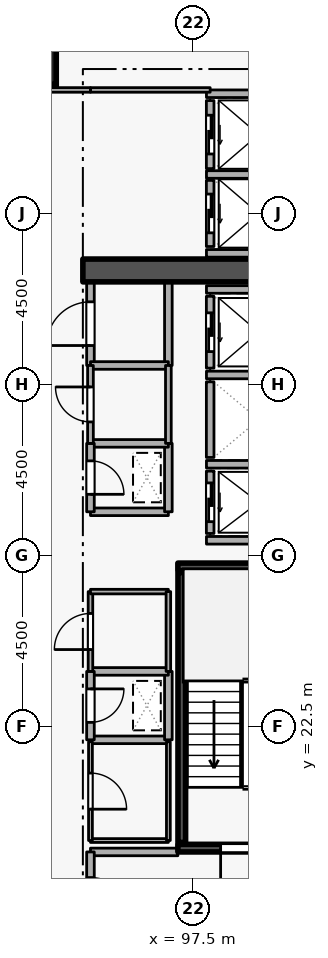
"""IFC4 building model, lengths in metres.
Left out: names, types, materials, properties, quantities, classifications, styles, units other than length and angle.
Written with IfcOpenShell. Run it as: python <this file> out.ifc"""

import sys

from ifc_helpers import new_model, si_unit, direction, frame, frame_2d, origin, origin_2d, place, context, subcontext, project, spatial, rectangle, extrude, element, fill, save


model = new_model("IFC4")
c1 = context("Model", 3, precision=1e-05, world=origin(), true_north=direction((0.0, 1.0)))
c2 = subcontext(c1, "Body", "Model", "MODEL_VIEW")
j1 = project(units=[si_unit("LENGTHUNIT", "METRE"), si_unit("PLANEANGLEUNIT", "RADIAN")], contexts=[c1])
p1 = place(None, origin())
s1 = spatial("IfcSite", under=j1, at=p1, CompositionType="ELEMENT")
p2 = place(p1, origin())
s2 = spatial("IfcBuilding", under=s1, at=p2, CompositionType="ELEMENT")
p3 = place(p2, frame((0.0, 0.0, 87.3)))
s3 = spatial("IfcBuildingStorey", under=s2, at=p3, CompositionType="ELEMENT", Elevation=87.3)
p4 = place(p3, frame((94.6, 34.5, 0.0), z_axis=(0.0, 0.0, 1.0), x_axis=(1.0, 0.0, 0.0)))
e1 = element("IfcWall", 1, at=p4, inside=s3, PredefinedType="SHEAR", context=c2, shape_type="SweptSolid", body=[
    extrude(rectangle(XDim=5.7, YDim=0.6, at=frame_2d((2.85, 0.0))), origin(), (0.0, 0.0, 1.0), 3.6),
])
p5 = place(p3, frame((93.3, 40.0, 0.0), z_axis=(0.0, 0.0, 1.0), x_axis=(1.0, 0.0, 0.0)))
e2 = element("IfcColumn", 2, at=p5, inside=s3, PredefinedType="COLUMN", context=c2, shape_type="SweptSolid", body=[
    extrude(rectangle(XDim=1.2, YDim=1.2, at=origin_2d()), origin(), (0.0, 0.0, 1.0), 3.6),
])
p6 = place(p3, frame((97.95, 29.22, 0.0), z_axis=(0.0, 0.0, 1.0), x_axis=(0.0, -1.0, 0.0)))
e3 = element("IfcWall", 3, at=p6, inside=s3, PredefinedType="STANDARD", context=c2, shape_type="SweptSolid", body=[
    extrude(rectangle(XDim=1.64, YDim=0.2, at=frame_2d((0.82, 0.0))), origin(), (0.0, 0.0, 1.0), 3.34),
])
p7 = place(p6, frame((0.31, 0.0, 0.0)))
e4 = element("IfcOpeningElement", 4, at=p7, cuts=e3, PredefinedType="OPENING", context=c2, shape_type="SweptSolid", body=[
    extrude(rectangle(XDim=1.02, YDim=2.06, at=frame_2d((0.51, 1.03))), frame((0.0, 0.11, 0.0), z_axis=(0.0, -1.0, 0.0), x_axis=(1.0, 0.0, 0.0)), (0.0, 0.0, 1.0), 0.22),
])
p8 = place(p3, frame((97.95, 31.57, 0.0), z_axis=(0.0, 0.0, 1.0), x_axis=(0.0, -1.0, 0.0)))
e5 = element("IfcWall", 5, at=p8, inside=s3, PredefinedType="STANDARD", context=c2, shape_type="SweptSolid", body=[
    extrude(rectangle(XDim=1.99, YDim=0.2, at=frame_2d((0.995, 0.0))), origin(), (0.0, 0.0, 1.0), 3.34),
])
p9 = place(p3, frame((97.95, 33.82, 0.0), z_axis=(0.0, 0.0, 1.0), x_axis=(0.0, -1.0, 0.0)))
e6 = element("IfcWall", 6, at=p9, inside=s3, PredefinedType="STANDARD", context=c2, shape_type="SweptSolid", body=[
    extrude(rectangle(XDim=1.89, YDim=0.2, at=frame_2d((0.945, 0.0))), origin(), (0.0, 0.0, 1.0), 3.34),
])
p10 = place(p9, frame((0.435, 0.0, 0.0)))
e7 = element("IfcOpeningElement", 7, at=p10, cuts=e6, PredefinedType="OPENING", context=c2, shape_type="SweptSolid", body=[
    extrude(rectangle(XDim=1.02, YDim=2.06, at=frame_2d((0.51, 1.03))), frame((0.0, 0.11, 0.0), z_axis=(0.0, -1.0, 0.0), x_axis=(1.0, 0.0, 0.0)), (0.0, 0.0, 1.0), 0.22),
])
p11 = place(p3, frame((97.95, 36.87, 0.0), z_axis=(0.0, 0.0, 1.0), x_axis=(0.0, -1.0, 0.0)))
e8 = element("IfcWall", 8, at=p11, inside=s3, PredefinedType="STANDARD", context=c2, shape_type="SweptSolid", body=[
    extrude(rectangle(XDim=1.74, YDim=0.2, at=frame_2d((0.87, 0.0))), origin(), (0.0, 0.0, 1.0), 3.34),
])
p12 = place(p11, frame((0.36, 0.0, 0.0)))
e9 = element("IfcOpeningElement", 9, at=p12, cuts=e8, PredefinedType="OPENING", context=c2, shape_type="SweptSolid", body=[
    extrude(rectangle(XDim=1.02, YDim=2.06, at=frame_2d((0.51, 1.03))), frame((0.0, 0.11, 0.0), z_axis=(0.0, -1.0, 0.0), x_axis=(1.0, 0.0, 0.0)), (0.0, 0.0, 1.0), 0.22),
])
p13 = place(p3, frame((97.95, 38.97, 0.0), z_axis=(0.0, 0.0, 1.0), x_axis=(0.0, -1.0, 0.0)))
e10 = element("IfcWall", 10, at=p13, inside=s3, PredefinedType="STANDARD", context=c2, shape_type="SweptSolid", body=[
    extrude(rectangle(XDim=1.79, YDim=0.2, at=frame_2d((0.895, 0.0))), origin(), (0.0, 0.0, 1.0), 3.34),
])
p14 = place(p13, frame((0.385, 0.0, 0.0)))
e11 = element("IfcOpeningElement", 11, at=p14, cuts=e10, PredefinedType="OPENING", context=c2, shape_type="SweptSolid", body=[
    extrude(rectangle(XDim=1.02, YDim=2.06, at=frame_2d((0.51, 1.03))), frame((0.0, 0.11, 0.0), z_axis=(0.0, -1.0, 0.0), x_axis=(1.0, 0.0, 0.0)), (0.0, 0.0, 1.0), 0.22),
])
for number, where, z_axis, x_axis in (
    (12, (97.852, 29.4, 0.0), (0.0, 0.0, 1.0), (1.0, 0.0, 0.0)),
    (13, (97.852, 27.4, 0.0), (0.0, 0.0, 1.0), (1.0, 0.0, 0.0)),
    (14, (97.852, 31.75, 0.0), (0.0, 0.0, 1.0), (1.0, 0.0, 0.0)),
    (15, (97.852, 34.0, 0.0), (0.0, 0.0, 1.0), (1.0, 0.0, 0.0)),
):
    element("IfcWall", number, at=place(p3, frame(where, z_axis=z_axis, x_axis=x_axis)), inside=s3, PredefinedType="STANDARD", context=c2, shape_type="SweptSolid", body=[
        extrude(rectangle(XDim=2.436, YDim=0.2, at=frame_2d((1.218, 0.0))), origin(), (0.0, 0.0, 1.0), 3.34),
    ])
for number, where, z_axis, x_axis in (
    (16, (97.852, 37.025, 0.0), (0.0, 0.0, 1.0), (1.0, 0.0, 0.0)),
    (17, (97.852, 34.95, 0.0), (0.0, 0.0, 1.0), (1.0, 0.0, 0.0)),
):
    element("IfcWall", number, at=place(p3, frame(where, z_axis=z_axis, x_axis=x_axis)), inside=s3, PredefinedType="STANDARD", context=c2, shape_type="SweptSolid", body=[
        extrude(rectangle(XDim=2.746, YDim=0.2, at=frame_2d((1.373, 0.0))), origin(), (0.0, 0.0, 1.0), 3.34),
    ])
p15 = place(p3, frame((97.852, 39.15, 0.0), z_axis=(0.0, 0.0, 1.0), x_axis=(1.0, 0.0, 0.0)))
e18 = element("IfcWall", 18, at=p15, inside=s3, PredefinedType="STANDARD", context=c2, shape_type="SweptSolid", body=[
    extrude(rectangle(XDim=2.636, YDim=0.2, at=frame_2d((1.318, 0.0))), origin(), (0.0, 0.0, 1.0), 3.34),
])
p16 = place(p3, frame((100.45, 19.3, 0.0), z_axis=(0.0, 0.0, 1.0), x_axis=(-1.0, 0.0, 0.0)))
e19 = element("IfcWall", 19, at=p16, inside=s3, PredefinedType="SHEAR", context=c2, shape_type="SweptSolid", body=[
    extrude(rectangle(XDim=3.35, YDim=0.2, at=frame_2d((1.675, 0.0))), origin(), (0.0, 0.0, 1.0), 3.6),
])
p17 = place(p16, frame((1.125, 0.0, 0.0)))
e20 = element("IfcOpeningElement", 20, at=p17, cuts=e19, PredefinedType="OPENING", context=c2, shape_type="SweptSolid", body=[
    extrude(rectangle(XDim=1.1, YDim=2.1, at=frame_2d((0.55, 1.05))), frame((0.0, 0.11, 0.0), z_axis=(0.0, -1.0, 0.0), x_axis=(1.0, 0.0, 0.0)), (0.0, 0.0, 1.0), 0.22),
])
p18 = place(p3, frame((97.1, 26.7, 0.0), z_axis=(0.0, 0.0, 1.0), x_axis=(1.0, 0.0, 0.0)))
e21 = element("IfcWall", 21, at=p18, inside=s3, PredefinedType="SHEAR", context=c2, shape_type="SweptSolid", body=[
    extrude(rectangle(XDim=3.35, YDim=0.2, at=frame_2d((1.675, 0.0))), origin(), (0.0, 0.0, 1.0), 3.6),
])
p19 = place(p3, frame((97.203, 26.55, 0.0), z_axis=(0.0, 0.0, 1.0), x_axis=(0.0, -1.0, 0.0)))
e22 = element("IfcWall", 22, at=p19, inside=s3, PredefinedType="SHEAR", context=c2, shape_type="SweptSolid", body=[
    extrude(rectangle(XDim=7.1, YDim=0.2, at=frame_2d((3.55, 0.0))), origin(), (0.0, 0.0, 1.0), 3.6),
])
p20 = place(p3, frame((97.1, 19.2, 0.0), z_axis=(0.0, 0.0, 1.0), x_axis=(-1.0, 0.0, 0.0)))
e23 = element("IfcWall", 23, at=p20, inside=s3, PredefinedType="STANDARD", context=c2, shape_type="SweptSolid", body=[
    extrude(rectangle(XDim=2.3, YDim=0.2, at=frame_2d((1.15, 0.0))), origin(), (0.0, 0.0, 1.0), 2.545),
])
p21 = place(p3, frame((94.8, 19.2, 0.0), z_axis=(0.0, 0.0, 1.0), x_axis=(0.0, -1.0, 0.0)))
e24 = element("IfcWall", 24, at=p21, inside=s3, PredefinedType="STANDARD", context=c2, shape_type="SweptSolid", body=[
    extrude(rectangle(XDim=2.5, YDim=0.2, at=frame_2d((1.25, 0.0))), origin(), (0.0, 0.0, 1.0), 3.34),
])
p22 = place(p21, frame((0.675, 0.0, 0.0)))
e25 = element("IfcOpeningElement", 25, at=p22, cuts=e24, PredefinedType="OPENING", context=c2, shape_type="SweptSolid", body=[
    extrude(rectangle(XDim=1.15, YDim=2.1, at=frame_2d((0.575, 1.05))), frame((0.0, 0.11, 0.0), z_axis=(0.0, -1.0, 0.0), x_axis=(1.0, 0.0, 0.0)), (0.0, 0.0, 1.0), 0.22),
])
p23 = place(p3, frame((94.8, 28.15, 0.0), z_axis=(0.0, 0.0, 1.0), x_axis=(1.0, 0.0, 0.0)))
e26 = element("IfcWall", 26, at=p23, inside=s3, PredefinedType="STANDARD", context=c2, shape_type="SweptSolid", body=[
    extrude(rectangle(XDim=2.05, YDim=0.2, at=frame_2d((1.025, 0.0))), origin(), (0.0, 0.0, 1.0), 3.34),
])
p24 = place(p3, frame((96.85, 28.15, 0.0), z_axis=(0.0, 0.0, 1.0), x_axis=(0.0, 1.0, 0.0)))
e27 = element("IfcWall", 27, at=p24, inside=s3, PredefinedType="STANDARD", context=c2, shape_type="SweptSolid", body=[
    extrude(rectangle(XDim=1.8, YDim=0.2, at=frame_2d((0.9, 0.0))), origin(), (0.0, 0.0, 1.0), 3.34),
])
p25 = place(p3, frame((96.85, 29.95, 0.0), z_axis=(0.0, 0.0, 1.0), x_axis=(-1.0, 0.0, 0.0)))
e28 = element("IfcWall", 28, at=p25, inside=s3, PredefinedType="STANDARD", context=c2, shape_type="SweptSolid", body=[
    extrude(rectangle(XDim=2.05, YDim=0.2, at=frame_2d((1.025, 0.0))), origin(), (0.0, 0.0, 1.0), 3.34),
])
p26 = place(p3, frame((94.8, 29.95, 0.0), z_axis=(0.0, 0.0, 1.0), x_axis=(0.0, -1.0, 0.0)))
e29 = element("IfcWall", 29, at=p26, inside=s3, PredefinedType="STANDARD", context=c2, shape_type="SweptSolid", body=[
    extrude(rectangle(XDim=1.8, YDim=0.2, at=frame_2d((0.9, 0.0))), origin(), (0.0, 0.0, 1.0), 3.34),
])
p27 = place(p26, frame((0.46, 0.0, 0.0)))
e30 = element("IfcOpeningElement", 30, at=p27, cuts=e29, PredefinedType="OPENING", context=c2, shape_type="SweptSolid", body=[
    extrude(rectangle(XDim=0.88, YDim=2.04, at=frame_2d((0.44, 1.02))), frame((0.0, 0.11, 0.0), z_axis=(0.0, -1.0, 0.0), x_axis=(1.0, 0.0, 0.0)), (0.0, 0.0, 1.0), 0.22),
])
p28 = place(p3, frame((94.8, 22.15, 0.0), z_axis=(0.0, 0.0, 1.0), x_axis=(1.0, 0.0, 0.0)))
e31 = element("IfcWall", 31, at=p28, inside=s3, PredefinedType="STANDARD", context=c2, shape_type="SweptSolid", body=[
    extrude(rectangle(XDim=2.05, YDim=0.2, at=frame_2d((1.025, 0.0))), origin(), (0.0, 0.0, 1.0), 3.34),
])
p29 = place(p3, frame((96.85, 22.15, 0.0), z_axis=(0.0, 0.0, 1.0), x_axis=(0.0, 1.0, 0.0)))
e32 = element("IfcWall", 32, at=p29, inside=s3, PredefinedType="STANDARD", context=c2, shape_type="SweptSolid", body=[
    extrude(rectangle(XDim=1.8, YDim=0.2, at=frame_2d((0.9, 0.0))), origin(), (0.0, 0.0, 1.0), 3.34),
])
p30 = place(p3, frame((96.85, 23.95, 0.0), z_axis=(0.0, 0.0, 1.0), x_axis=(-1.0, 0.0, 0.0)))
e33 = element("IfcWall", 33, at=p30, inside=s3, PredefinedType="STANDARD", context=c2, shape_type="SweptSolid", body=[
    extrude(rectangle(XDim=2.05, YDim=0.2, at=frame_2d((1.025, 0.0))), origin(), (0.0, 0.0, 1.0), 3.34),
])
p31 = place(p3, frame((94.8, 23.95, 0.0), z_axis=(0.0, 0.0, 1.0), x_axis=(0.0, -1.0, 0.0)))
e34 = element("IfcWall", 34, at=p31, inside=s3, PredefinedType="STANDARD", context=c2, shape_type="SweptSolid", body=[
    extrude(rectangle(XDim=1.8, YDim=0.2, at=frame_2d((0.9, 0.0))), origin(), (0.0, 0.0, 1.0), 3.34),
])
p32 = place(p31, frame((0.46, 0.0, 0.0)))
e35 = element("IfcOpeningElement", 35, at=p32, cuts=e34, PredefinedType="OPENING", context=c2, shape_type="SweptSolid", body=[
    extrude(rectangle(XDim=0.88, YDim=2.04, at=frame_2d((0.44, 1.02))), frame((0.0, 0.11, 0.0), z_axis=(0.0, -1.0, 0.0), x_axis=(1.0, 0.0, 0.0)), (0.0, 0.0, 1.0), 0.22),
])
p33 = place(p3, frame((94.8, 32.0, 0.0), z_axis=(0.0, 0.0, 1.0), x_axis=(0.0, 1.0, 0.0)))
e36 = element("IfcWall", 36, at=p33, inside=s3, PredefinedType="STANDARD", context=c2, shape_type="SweptSolid", body=[
    extrude(rectangle(XDim=2.2, YDim=0.2, at=frame_2d((1.1, 0.0))), origin(), (0.0, 0.0, 1.0), 3.34),
])
p34 = place(p33, frame((0.525, 0.0, 0.0)))
e37 = element("IfcOpeningElement", 37, at=p34, cuts=e36, PredefinedType="OPENING", context=c2, shape_type="SweptSolid", body=[
    extrude(rectangle(XDim=1.15, YDim=2.1, at=frame_2d((0.575, 1.05))), frame((0.0, 0.11, 0.0), z_axis=(0.0, -1.0, 0.0), x_axis=(1.0, 0.0, 0.0)), (0.0, 0.0, 1.0), 0.22),
])
p35 = place(p3, frame((96.85, 34.2, 0.0), z_axis=(0.0, 0.0, 1.0), x_axis=(0.0, -1.0, 0.0)))
e38 = element("IfcWall", 38, at=p35, inside=s3, PredefinedType="STANDARD", context=c2, shape_type="SweptSolid", body=[
    extrude(rectangle(XDim=2.2, YDim=0.2, at=frame_2d((1.1, 0.0))), origin(), (0.0, 0.0, 1.0), 3.34),
])
p36 = place(p3, frame((96.85, 32.0, 0.0), z_axis=(0.0, 0.0, 1.0), x_axis=(-1.0, 0.0, 0.0)))
e39 = element("IfcWall", 39, at=p36, inside=s3, PredefinedType="STANDARD", context=c2, shape_type="SweptSolid", body=[
    extrude(rectangle(XDim=2.05, YDim=0.2, at=frame_2d((1.025, 0.0))), origin(), (0.0, 0.0, 1.0), 3.34),
])
p37 = place(p3, frame((94.8, 19.5, 0.0), z_axis=(0.0, 0.0, 1.0), x_axis=(1.0, 0.0, 0.0)))
e40 = element("IfcWall", 40, at=p37, inside=s3, PredefinedType="PARTITIONING", context=c2, shape_type="SweptSolid", body=[
    extrude(rectangle(XDim=2.05, YDim=0.1, at=frame_2d((1.025, 0.0))), origin(), (0.0, 0.0, 1.0), 2.545),
])
p38 = place(p3, frame((96.85, 19.5, 0.0), z_axis=(0.0, 0.0, 1.0), x_axis=(0.0, 1.0, 0.0)))
e41 = element("IfcWall", 41, at=p38, inside=s3, PredefinedType="PARTITIONING", context=c2, shape_type="SweptSolid", body=[
    extrude(rectangle(XDim=2.6, YDim=0.1, at=frame_2d((1.3, 0.0))), origin(), (0.0, 0.0, 1.0), 3.34),
])
p39 = place(p3, frame((94.8, 22.1, 0.0), z_axis=(0.0, 0.0, 1.0), x_axis=(0.0, -1.0, 0.0)))
e42 = element("IfcWall", 42, at=p39, inside=s3, PredefinedType="PARTITIONING", context=c2, shape_type="SweptSolid", body=[
    extrude(rectangle(XDim=2.6, YDim=0.1, at=frame_2d((1.3, 0.0))), origin(), (0.0, 0.0, 1.0), 3.34),
])
p40 = place(p39, frame((0.825, 0.0, 0.0)))
e43 = element("IfcOpeningElement", 43, at=p40, cuts=e42, PredefinedType="OPENING", context=c2, shape_type="SweptSolid", body=[
    extrude(rectangle(XDim=0.95, YDim=2.1, at=frame_2d((0.475, 1.05))), frame((0.0, 0.06, 0.0), z_axis=(0.0, -1.0, 0.0), x_axis=(1.0, 0.0, 0.0)), (0.0, 0.0, 1.0), 0.12),
])
p41 = place(p3, frame((94.8, 23.95, 0.0), z_axis=(0.0, 0.0, 1.0), x_axis=(0.0, 1.0, 0.0)))
e44 = element("IfcWall", 44, at=p41, inside=s3, PredefinedType="PARTITIONING", context=c2, shape_type="SweptSolid", body=[
    extrude(rectangle(XDim=2.1, YDim=0.12, at=frame_2d((1.05, 0.0))), origin(), (0.0, 0.0, 1.0), 3.34),
])
p42 = place(p41, frame((0.575, 0.0, 0.0)))
e45 = element("IfcOpeningElement", 45, at=p42, cuts=e44, PredefinedType="OPENING", context=c2, shape_type="SweptSolid", body=[
    extrude(rectangle(XDim=0.95, YDim=2.1, at=frame_2d((0.475, 1.05))), frame((0.0, 0.07, 0.0), z_axis=(0.0, -1.0, 0.0), x_axis=(1.0, 0.0, 0.0)), (0.0, 0.0, 1.0), 0.14),
])
p43 = place(p3, frame((94.8, 26.05, 0.0), z_axis=(0.0, 0.0, 1.0), x_axis=(1.0, 0.0, 0.0)))
e46 = element("IfcWall", 46, at=p43, inside=s3, PredefinedType="PARTITIONING", context=c2, shape_type="SweptSolid", body=[
    extrude(rectangle(XDim=2.05, YDim=0.12, at=frame_2d((1.025, 0.0))), origin(), (0.0, 0.0, 1.0), 3.34),
])
p44 = place(p3, frame((96.85, 26.05, 0.0), z_axis=(0.0, 0.0, 1.0), x_axis=(0.0, -1.0, 0.0)))
e47 = element("IfcWall", 47, at=p44, inside=s3, PredefinedType="PARTITIONING", context=c2, shape_type="SweptSolid", body=[
    extrude(rectangle(XDim=2.1, YDim=0.12, at=frame_2d((1.05, 0.0))), origin(), (0.0, 0.0, 1.0), 3.34),
])
p45 = place(p3, frame((94.8, 29.95, 0.0), z_axis=(0.0, 0.0, 1.0), x_axis=(0.0, 1.0, 0.0)))
e48 = element("IfcWall", 48, at=p45, inside=s3, PredefinedType="PARTITIONING", context=c2, shape_type="SweptSolid", body=[
    extrude(rectangle(XDim=2.05, YDim=0.15, at=frame_2d((1.025, 0.0))), origin(), (0.0, 0.0, 1.0), 3.34),
])
p46 = place(p45, frame((0.565, 0.0, 0.0)))
e49 = element("IfcOpeningElement", 49, at=p46, cuts=e48, PredefinedType="OPENING", context=c2, shape_type="SweptSolid", body=[
    extrude(rectangle(XDim=0.92, YDim=2.08, at=frame_2d((0.46, 1.04))), frame((0.0, 0.085, 0.0), z_axis=(0.0, -1.0, 0.0), x_axis=(1.0, 0.0, 0.0)), (0.0, 0.0, 1.0), 0.17),
])
p47 = place(p3, frame((96.85, 32.0, 0.0), z_axis=(0.0, 0.0, 1.0), x_axis=(0.0, -1.0, 0.0)))
e50 = element("IfcWall", 50, at=p47, inside=s3, PredefinedType="PARTITIONING", context=c2, shape_type="SweptSolid", body=[
    extrude(rectangle(XDim=2.05, YDim=0.15, at=frame_2d((1.025, 0.0))), origin(), (0.0, 0.0, 1.0), 3.34),
])
p48 = place(p3, frame((97.95, 39.25, 0.0), z_axis=(0.0, 0.0, 1.0), x_axis=(-1.0, 0.0, 0.0)))
e51 = element("IfcWall", 51, at=p48, inside=s3, PredefinedType="PARTITIONING", context=c2, shape_type="SweptSolid", body=[
    extrude(rectangle(XDim=3.15, YDim=0.12, at=frame_2d((1.575, 0.0))), origin(), (0.0, 0.0, 1.0), 3.34),
])
p49 = place(p3, frame((94.8, 39.25, 0.0), z_axis=(0.0, 0.0, 1.0), x_axis=(-1.0, 0.0, 0.0)))
e52 = element("IfcWall", 52, at=p49, inside=s3, PredefinedType="PARTITIONING", context=c2, shape_type="SweptSolid", body=[
    extrude(rectangle(XDim=1.85, YDim=0.12, at=frame_2d((0.925, 0.0))), origin(), (0.0, 0.0, 1.0), 3.34),
])
p50 = place(p7, origin())
e53 = element("IfcDoor", 53, at=p50, inside=s3, OperationType="SLIDING_TO_LEFT", PredefinedType="DOOR", context=c2, shape_type="SweptSolid", body=[
    extrude(rectangle(XDim=1.02, YDim=2.06, at=frame_2d((0.51, 1.03))), frame((0.0, 0.025, 0.0), z_axis=(0.0, -1.0, 0.0), x_axis=(1.0, 0.0, 0.0)), (0.0, 0.0, 1.0), 0.05),
])
fill(e4, e53)
p51 = place(p10, origin())
e54 = element("IfcDoor", 54, at=p51, inside=s3, OperationType="SLIDING_TO_LEFT", PredefinedType="DOOR", context=c2, shape_type="SweptSolid", body=[
    extrude(rectangle(XDim=1.02, YDim=2.06, at=frame_2d((0.51, 1.03))), frame((0.0, 0.025, 0.0), z_axis=(0.0, -1.0, 0.0), x_axis=(1.0, 0.0, 0.0)), (0.0, 0.0, 1.0), 0.05),
])
fill(e7, e54)
p52 = place(p12, origin())
e55 = element("IfcDoor", 55, at=p52, inside=s3, OperationType="SLIDING_TO_LEFT", PredefinedType="DOOR", context=c2, shape_type="SweptSolid", body=[
    extrude(rectangle(XDim=1.02, YDim=2.06, at=frame_2d((0.51, 1.03))), frame((0.0, 0.025, 0.0), z_axis=(0.0, -1.0, 0.0), x_axis=(1.0, 0.0, 0.0)), (0.0, 0.0, 1.0), 0.05),
])
fill(e9, e55)
p53 = place(p14, origin())
e56 = element("IfcDoor", 56, at=p53, inside=s3, OperationType="SLIDING_TO_LEFT", PredefinedType="DOOR", context=c2, shape_type="SweptSolid", body=[
    extrude(rectangle(XDim=1.02, YDim=2.06, at=frame_2d((0.51, 1.03))), frame((0.0, 0.025, 0.0), z_axis=(0.0, -1.0, 0.0), x_axis=(1.0, 0.0, 0.0)), (0.0, 0.0, 1.0), 0.05),
])
fill(e11, e56)
p54 = place(p17, origin())
e57 = element("IfcDoor", 57, at=p54, inside=s3, OperationType="SINGLE_SWING_RIGHT", PredefinedType="DOOR", context=c2, shape_type="SweptSolid", body=[
    extrude(rectangle(XDim=1.1, YDim=2.1, at=frame_2d((0.55, 1.05))), frame((0.0, 0.025, 0.0), z_axis=(0.0, -1.0, 0.0), x_axis=(1.0, 0.0, 0.0)), (0.0, 0.0, 1.0), 0.05),
])
fill(e20, e57)
p55 = place(p22, origin())
e58 = element("IfcDoor", 58, at=p55, inside=s3, OperationType="SINGLE_SWING_RIGHT", PredefinedType="DOOR", context=c2, shape_type="SweptSolid", body=[
    extrude(rectangle(XDim=1.15, YDim=2.1, at=frame_2d((0.575, 1.05))), frame((0.0, 0.025, 0.0), z_axis=(0.0, -1.0, 0.0), x_axis=(1.0, 0.0, 0.0)), (0.0, 0.0, 1.0), 0.05),
])
fill(e25, e58)
p56 = place(p27, origin())
e59 = element("IfcDoor", 59, at=p56, inside=s3, OperationType="SINGLE_SWING_RIGHT", PredefinedType="DOOR", context=c2, shape_type="SweptSolid", body=[
    extrude(rectangle(XDim=0.88, YDim=2.04, at=frame_2d((0.44, 1.02))), frame((0.0, 0.025, 0.0), z_axis=(0.0, -1.0, 0.0), x_axis=(1.0, 0.0, 0.0)), (0.0, 0.0, 1.0), 0.05),
])
fill(e30, e59)
p57 = place(p32, origin())
e60 = element("IfcDoor", 60, at=p57, inside=s3, OperationType="SINGLE_SWING_LEFT", PredefinedType="DOOR", context=c2, shape_type="SweptSolid", body=[
    extrude(rectangle(XDim=0.88, YDim=2.04, at=frame_2d((0.44, 1.02))), frame((0.0, 0.025, 0.0), z_axis=(0.0, -1.0, 0.0), x_axis=(1.0, 0.0, 0.0)), (0.0, 0.0, 1.0), 0.05),
])
fill(e35, e60)
p58 = place(p40, origin())
e61 = element("IfcDoor", 61, at=p58, inside=s3, OperationType="SINGLE_SWING_RIGHT", PredefinedType="DOOR", context=c2, shape_type="SweptSolid", body=[
    extrude(rectangle(XDim=0.95, YDim=2.1, at=frame_2d((0.475, 1.05))), frame((0.0, 0.025, 0.0), z_axis=(0.0, -1.0, 0.0), x_axis=(1.0, 0.0, 0.0)), (0.0, 0.0, 1.0), 0.05),
])
fill(e43, e61)
p59 = place(p42, origin())
e62 = element("IfcDoor", 62, at=p59, inside=s3, OperationType="SINGLE_SWING_LEFT", PredefinedType="DOOR", context=c2, shape_type="SweptSolid", body=[
    extrude(rectangle(XDim=0.95, YDim=2.1, at=frame_2d((0.475, 1.05))), frame((0.0, 0.025, 0.0), z_axis=(0.0, -1.0, 0.0), x_axis=(1.0, 0.0, 0.0)), (0.0, 0.0, 1.0), 0.05),
])
fill(e45, e62)
p60 = place(p46, origin())
e63 = element("IfcDoor", 63, at=p60, inside=s3, OperationType="SINGLE_SWING_RIGHT", PredefinedType="DOOR", context=c2, shape_type="SweptSolid", body=[
    extrude(rectangle(XDim=0.92, YDim=2.08, at=frame_2d((0.46, 1.04))), frame((0.0, 0.025, 0.0), z_axis=(0.0, -1.0, 0.0), x_axis=(1.0, 0.0, 0.0)), (0.0, 0.0, 1.0), 0.05),
])
fill(e49, e63)
p61 = place(p34, origin())
e64 = element("IfcDoor", 64, at=p61, inside=s3, OperationType="SINGLE_SWING_LEFT", PredefinedType="DOOR", context=c2, shape_type="SweptSolid", body=[
    extrude(rectangle(XDim=1.15, YDim=2.1, at=frame_2d((0.575, 1.05))), frame((0.0, 0.025, 0.0), z_axis=(0.0, -1.0, 0.0), x_axis=(1.0, 0.0, 0.0)), (0.0, 0.0, 1.0), 0.05),
])
fill(e37, e64)
save(model, sys.argv[1])
